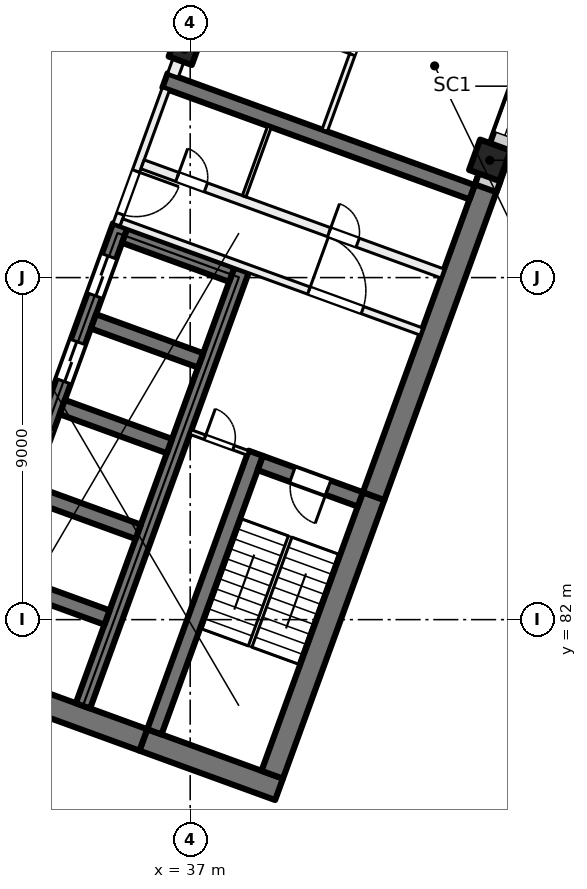
"""IFC4 building model, lengths in metres.
Left out: names, types, materials, properties, quantities, classifications, styles, units other than length and angle.
Written with IfcOpenShell. Run it as: python <this file> out.ifc"""

import sys

from ifc_helpers import new_model, si_unit, direction, frame, frame_2d, origin, origin_2d, place, context, subcontext, project, spatial, rectangle, extrude, element, fill, save


model = new_model("IFC4")
c1 = context("Model", 3, precision=1e-05, world=origin(), true_north=direction((0.0, 1.0)))
c2 = subcontext(c1, "Body", "Model", "MODEL_VIEW")
j1 = project(units=[si_unit("LENGTHUNIT", "METRE"), si_unit("PLANEANGLEUNIT", "RADIAN")], contexts=[c1])
p1 = place(None, origin())
s1 = spatial("IfcSite", under=j1, at=p1, CompositionType="ELEMENT")
p2 = place(p1, origin())
s2 = spatial("IfcBuilding", under=s1, at=p2, CompositionType="ELEMENT")
p3 = place(p2, frame((0.0, 0.0, 97.0)))
s3 = spatial("IfcBuildingStorey", under=s2, at=p3, CompositionType="ELEMENT", Elevation=97.0)
p4 = place(p3, frame((36.849, 97.011, 0.0), z_axis=(0.0, 0.0, 1.0), x_axis=(-0.342020143326, -0.939692620786, 0.0)))
e1 = element("IfcColumn", 1, at=p4, inside=s3, PredefinedType="COLUMN", context=c2, shape_type="SweptSolid", body=[
    extrude(rectangle(XDim=0.65, YDim=0.65, at=origin_2d()), origin(), (0.0, 0.0, 1.0), 4.0),
])
p5 = place(p3, frame((44.884, 94.087, 0.0), z_axis=(0.0, 0.0, 1.0), x_axis=(-0.342020143326, -0.939692620786, 0.0)))
e2 = element("IfcColumn", 2, at=p5, inside=s3, PredefinedType="COLUMN", context=c2, shape_type="SweptSolid", body=[
    extrude(rectangle(XDim=0.85, YDim=0.85, at=origin_2d()), origin(), (0.0, 0.0, 1.0), 4.0),
])
p6 = place(p3, frame((39.338, 77.535, 0.0), z_axis=(0.0, 0.0, 1.0), x_axis=(-0.939701471648, 0.341995824804, 0.0)))
e3 = element("IfcWall", 3, at=p6, inside=s3, PredefinedType="SHEAR", context=c2, shape_type="SweptSolid", body=[
    extrude(rectangle(XDim=3.8, YDim=0.6, at=frame_2d((1.9, 0.0))), origin(), (0.0, 0.0, 1.0), 4.0),
])
p7 = place(p3, frame((35.767, 78.835, 0.0), z_axis=(0.0, 0.0, 1.0), x_axis=(-0.939692894512, 0.342019391267, 0.0)))
e4 = element("IfcWall", 4, at=p7, inside=s3, PredefinedType="SHEAR", context=c2, shape_type="SweptSolid", body=[
    extrude(rectangle(XDim=14.4, YDim=0.6, at=frame_2d((7.2, 0.0))), origin(), (0.0, 0.0, 1.0), 4.0),
])
p8 = place(p3, frame((39.159, 77.92, 0.0), z_axis=(0.0, 0.0, 1.0), x_axis=(0.342016982193, 0.939693771338, 0.0)))
e5 = element("IfcWall", 5, at=p8, inside=s3, PredefinedType="SHEAR", context=c2, shape_type="SweptSolid", body=[
    extrude(rectangle(XDim=7.8, YDim=0.6, at=frame_2d((3.9, 0.0))), origin(), (0.0, 0.0, 1.0), 4.0),
])
p9 = place(p3, frame((41.827, 85.249, 0.0), z_axis=(0.0, 0.0, 1.0), x_axis=(0.342017595281, 0.939693548195, 0.0)))
e6 = element("IfcWall", 6, at=p9, inside=s3, PredefinedType="SHEAR", context=c2, shape_type="SweptSolid", body=[
    extrude(rectangle(XDim=8.925, YDim=0.6, at=frame_2d((4.462, 0.0))), origin(), (0.0, 0.0, 1.0), 4.0),
])
p10 = place(p3, frame((36.058, 79.048, 0.0), z_axis=(0.0, 0.0, 1.0), x_axis=(0.342016982193, 0.939693771338, 0.0)))
e7 = element("IfcWall", 7, at=p10, inside=s3, PredefinedType="SHEAR", context=c2, shape_type="SweptSolid", body=[
    extrude(rectangle(XDim=7.8, YDim=0.4, at=frame_2d((3.9, 0.0))), origin(), (0.0, 0.0, 1.0), 4.0),
])
p11 = place(p3, frame((41.476, 85.164, 0.0), z_axis=(0.0, 0.0, 1.0), x_axis=(-0.939678810556, 0.342058084236, 0.0)))
e8 = element("IfcWall", 8, at=p11, inside=s3, PredefinedType="SHEAR", context=c2, shape_type="SweptSolid", body=[
    extrude(rectangle(XDim=2.8, YDim=0.4, at=frame_2d((1.4, 0.0))), origin(), (0.0, 0.0, 1.0), 4.0),
])
p12 = place(p11, frame((0.9, 0.0, 0.0)))
e9 = element("IfcOpeningElement", 9, at=p12, cuts=e8, PredefinedType="OPENING", context=c2, shape_type="SweptSolid", body=[
    extrude(rectangle(XDim=1.0, YDim=2.1, at=frame_2d((0.5, 1.05))), frame((0.0, 0.21, 0.0), z_axis=(0.0, -1.0, 0.0), x_axis=(1.0, 0.0, 0.0)), (0.0, 0.0, 1.0), 0.42),
])
p13 = place(p3, frame((30.984, 80.895, 0.0), z_axis=(0.0, 0.0, 1.0), x_axis=(0.342021021735, 0.939692301071, 0.0)))
e10 = element("IfcWall", 10, at=p13, inside=s3, PredefinedType="SHEAR", context=c2, shape_type="SweptSolid", body=[
    extrude(rectangle(XDim=12.2, YDim=0.4, at=frame_2d((6.1, 0.0))), origin(), (0.0, 0.0, 1.0), 4.0),
])
p14 = place(p13, frame((5.45, 0.0, 0.0)))
e11 = element("IfcOpeningElement", 11, at=p14, cuts=e10, PredefinedType="OPENING", context=c2, shape_type="SweptSolid", body=[
    extrude(rectangle(XDim=1.1, YDim=2.1, at=frame_2d((0.55, 1.05))), frame((0.0, 0.21, 0.0), z_axis=(0.0, -1.0, 0.0), x_axis=(1.0, 0.0, 0.0)), (0.0, 0.0, 1.0), 0.42),
])
p15 = place(p13, frame((7.85, 0.0, 0.0)))
e12 = element("IfcOpeningElement", 12, at=p15, cuts=e10, PredefinedType="OPENING", context=c2, shape_type="SweptSolid", body=[
    extrude(rectangle(XDim=1.1, YDim=2.1, at=frame_2d((0.55, 1.05))), frame((0.0, 0.21, 0.0), z_axis=(0.0, -1.0, 0.0), x_axis=(1.0, 0.0, 0.0)), (0.0, 0.0, 1.0), 0.42),
])
p16 = place(p13, frame((10.25, 0.0, 0.0)))
e13 = element("IfcOpeningElement", 13, at=p16, cuts=e10, PredefinedType="OPENING", context=c2, shape_type="SweptSolid", body=[
    extrude(rectangle(XDim=1.1, YDim=2.1, at=frame_2d((0.55, 1.05))), frame((0.0, 0.21, 0.0), z_axis=(0.0, -1.0, 0.0), x_axis=(1.0, 0.0, 0.0)), (0.0, 0.0, 1.0), 0.42),
])
p17 = place(p3, frame((34.178, 79.732, 0.0), z_axis=(0.0, 0.0, 1.0), x_axis=(0.342014590177, 0.939694641948, 0.0)))
e14 = element("IfcWall", 14, at=p17, inside=s3, PredefinedType="SHEAR", context=c2, shape_type="SweptSolid", body=[
    extrude(rectangle(XDim=12.2, YDim=0.4, at=frame_2d((6.1, 0.0))), origin(), (0.0, 0.0, 1.0), 4.0),
])
for number, where, z_axis, x_axis in (
    (15, (34.812, 82.056, 0.0), (0.0, 0.0, 1.0), (-0.94, 0.342, 0.0)),
    (16, (35.632, 84.311, 0.0), (0.0, 0.0, 1.0), (-0.94, 0.342, 0.0)),
    (17, (36.453, 86.566, 0.0), (0.0, 0.0, 1.0), (-0.94, 0.342, 0.0)),
    (18, (37.274, 88.822, 0.0), (0.0, 0.0, 1.0), (-0.94, 0.342, 0.0)),
):
    element("IfcWall", number, at=place(p3, frame(where, z_axis=z_axis, x_axis=x_axis)), inside=s3, PredefinedType="SHEAR", context=c2, shape_type="SweptSolid", body=[
        extrude(rectangle(XDim=3.0, YDim=0.4, at=frame_2d((1.5, 0.0))), origin(), (0.0, 0.0, 1.0), 4.0),
    ])
p18 = place(p3, frame((38.095, 91.077, 0.0), z_axis=(0.0, 0.0, 1.0), x_axis=(-0.939676934218, 0.342063238742, 0.0)))
e19 = element("IfcWall", 19, at=p18, inside=s3, PredefinedType="SHEAR", context=c2, shape_type="SweptSolid", body=[
    extrude(rectangle(XDim=3.0, YDim=0.4, at=frame_2d((1.5, 0.0))), origin(), (0.0, 0.0, 1.0), 4.0),
])
p19 = place(p3, frame((44.418, 93.245, 0.0), z_axis=(0.0, 0.0, 1.0), x_axis=(-0.93969060187, 0.342025690201, 0.0)))
e20 = element("IfcWall", 20, at=p19, inside=s3, PredefinedType="SHEAR", context=c2, shape_type="SweptSolid", body=[
    extrude(rectangle(XDim=8.6, YDim=0.4, at=frame_2d((4.3, 0.0))), origin(), (0.0, 0.0, 1.0), 4.0),
])
p20 = place(p3, frame((52.212, 113.783, 0.0), z_axis=(0.0, 0.0, 1.0), x_axis=(-0.34202521188, -0.939690775968, 0.0)))
e21 = element("IfcWall", 21, at=p20, inside=s3, PredefinedType="SOLIDWALL", context=c2, shape_type="SweptSolid", body=[
    extrude(rectangle(XDim=21.745, YDim=0.6, at=frame_2d((10.873, 0.0))), origin(), (0.0, 0.0, 1.0), 3.625),
])
p21 = place(p20, frame((3.765, 0.0, 0.9)))
e22 = element("IfcOpeningElement", 22, at=p21, cuts=e21, PredefinedType="OPENING", context=c2, shape_type="SweptSolid", body=[
    extrude(rectangle(XDim=3.0, YDim=2.4, at=frame_2d((1.5, 1.2))), frame((0.0, 0.31, 0.0), z_axis=(0.0, -1.0, 0.0), x_axis=(1.0, 0.0, 0.0)), (0.0, 0.0, 1.0), 0.62),
])
p22 = place(p20, frame((8.265, 0.0, 0.9)))
e23 = element("IfcOpeningElement", 23, at=p22, cuts=e21, PredefinedType="OPENING", context=c2, shape_type="SweptSolid", body=[
    extrude(rectangle(XDim=3.0, YDim=2.4, at=frame_2d((1.5, 1.2))), frame((0.0, 0.31, 0.0), z_axis=(0.0, -1.0, 0.0), x_axis=(1.0, 0.0, 0.0)), (0.0, 0.0, 1.0), 0.62),
])
p23 = place(p20, frame((12.765, 0.0, 0.9)))
e24 = element("IfcOpeningElement", 24, at=p23, cuts=e21, PredefinedType="OPENING", context=c2, shape_type="SweptSolid", body=[
    extrude(rectangle(XDim=3.0, YDim=2.4, at=frame_2d((1.5, 1.2))), frame((0.0, 0.31, 0.0), z_axis=(0.0, -1.0, 0.0), x_axis=(1.0, 0.0, 0.0)), (0.0, 0.0, 1.0), 0.62),
])
p24 = place(p20, frame((17.265, 0.0, 0.9)))
e25 = element("IfcOpeningElement", 25, at=p24, cuts=e21, PredefinedType="OPENING", context=c2, shape_type="SweptSolid", body=[
    extrude(rectangle(XDim=3.0, YDim=2.4, at=frame_2d((1.5, 1.2))), frame((0.0, 0.31, 0.0), z_axis=(0.0, -1.0, 0.0), x_axis=(1.0, 0.0, 0.0)), (0.0, 0.0, 1.0), 0.62),
])
p25 = place(p3, frame((36.362, 95.964, 0.0), z_axis=(0.0, 0.0, 1.0), x_axis=(-0.341995824804, -0.939701471648, 0.0)))
e26 = element("IfcWall", 26, at=p25, inside=s3, PredefinedType="PARTITIONING", context=c2, shape_type="SweptSolid", body=[
    extrude(rectangle(XDim=3.8, YDim=0.2, at=frame_2d((1.9, 0.0))), origin(), (0.0, 0.0, 1.0), 3.625),
])
p26 = place(p25, frame((2.3, 0.0, 0.0)))
e27 = element("IfcOpeningElement", 27, at=p26, cuts=e26, PredefinedType="OPENING", context=c2, shape_type="SweptSolid", body=[
    extrude(rectangle(XDim=1.2, YDim=2.1, at=frame_2d((0.6, 1.05))), frame((0.0, 0.11, 0.0), z_axis=(0.0, -1.0, 0.0), x_axis=(1.0, 0.0, 0.0)), (0.0, 0.0, 1.0), 0.22),
])
p27 = place(p3, frame((35.19, 92.453, 0.0), z_axis=(0.0, 0.0, 1.0), x_axis=(0.939691552312, -0.342023078919, 0.0)))
e28 = element("IfcWall", 28, at=p27, inside=s3, PredefinedType="PARTITIONING", context=c2, shape_type="SweptSolid", body=[
    extrude(rectangle(XDim=8.4, YDim=0.2, at=frame_2d((4.2, 0.0))), origin(), (0.0, 0.0, 1.0), 3.625),
])
p28 = place(p27, frame((5.25, 0.0, 0.0)))
e29 = element("IfcOpeningElement", 29, at=p28, cuts=e28, PredefinedType="OPENING", context=c2, shape_type="SweptSolid", body=[
    extrude(rectangle(XDim=1.5, YDim=2.1, at=frame_2d((0.75, 1.05))), frame((0.0, 0.11, 0.0), z_axis=(0.0, -1.0, 0.0), x_axis=(1.0, 0.0, 0.0)), (0.0, 0.0, 1.0), 0.22),
])
p29 = place(p3, frame((35.746, 93.98, 0.0), z_axis=(0.0, 0.0, 1.0), x_axis=(0.939691552312, -0.342023078919, 0.0)))
e30 = element("IfcWall", 30, at=p29, inside=s3, PredefinedType="PARTITIONING", context=c2, shape_type="SweptSolid", body=[
    extrude(rectangle(XDim=8.4, YDim=0.25, at=frame_2d((4.2, 0.0))), origin(), (0.0, 0.0, 1.0), 3.625),
])
p30 = place(p29, frame((0.975, 0.0, 0.0)))
e31 = element("IfcOpeningElement", 31, at=p30, cuts=e30, PredefinedType="OPENING", context=c2, shape_type="SweptSolid", body=[
    extrude(rectangle(XDim=0.8, YDim=2.1, at=frame_2d((0.4, 1.05))), frame((0.0, 0.135, 0.0), z_axis=(0.0, -1.0, 0.0), x_axis=(1.0, 0.0, 0.0)), (0.0, 0.0, 1.0), 0.27),
])
p31 = place(p29, frame((5.225, 0.0, 0.0)))
e32 = element("IfcOpeningElement", 32, at=p31, cuts=e30, PredefinedType="OPENING", context=c2, shape_type="SweptSolid", body=[
    extrude(rectangle(XDim=0.8, YDim=2.1, at=frame_2d((0.4, 1.05))), frame((0.0, 0.135, 0.0), z_axis=(0.0, -1.0, 0.0), x_axis=(1.0, 0.0, 0.0)), (0.0, 0.0, 1.0), 0.27),
])
p32 = place(p3, frame((37.013, 86.935, 0.0), z_axis=(0.0, 0.0, 1.0), x_axis=(0.939659694648, -0.342110593602, 0.0)))
e33 = element("IfcWall", 33, at=p32, inside=s3, PredefinedType="PARTITIONING", context=c2, shape_type="SweptSolid", body=[
    extrude(rectangle(XDim=1.6, YDim=0.125, at=frame_2d((0.8, 0.0))), origin(), (0.0, 0.0, 1.0), 3.625),
])
p33 = place(p32, frame((0.4, 0.0, 0.0)))
e34 = element("IfcOpeningElement", 34, at=p33, cuts=e33, PredefinedType="OPENING", context=c2, shape_type="SweptSolid", body=[
    extrude(rectangle(XDim=0.8, YDim=2.1, at=frame_2d((0.4, 1.05))), frame((0.0, 0.073, 0.0), z_axis=(0.0, -1.0, 0.0), x_axis=(1.0, 0.0, 0.0)), (0.0, 0.0, 1.0), 0.145),
])
p34 = place(p3, frame((39.087, 94.973, 0.0), z_axis=(0.0, 0.0, 1.0), x_axis=(-0.342024501273, -0.939691034611, 0.0)))
e35 = element("IfcWall", 35, at=p34, inside=s3, PredefinedType="PARTITIONING", context=c2, shape_type="SweptSolid", body=[
    extrude(rectangle(XDim=1.95, YDim=0.1, at=frame_2d((0.975, 0.0))), origin(), (0.0, 0.0, 1.0), 3.625),
])
p35 = place(p3, frame((40.539, 94.87, 0.0), z_axis=(0.0, 0.0, 1.0), x_axis=(0.342082231415, 0.939670020247, 0.0)))
e36 = element("IfcWall", 36, at=p35, inside=s3, PredefinedType="PARTITIONING", context=c2, shape_type="SweptSolid", body=[
    extrude(rectangle(XDim=9.825, YDim=0.15, at=frame_2d((4.912, 0.0))), origin(), (0.0, 0.0, 1.0), 3.625),
])
p36 = place(p35, frame((2.125, 0.0, 0.0)))
e37 = element("IfcOpeningElement", 37, at=p36, cuts=e36, PredefinedType="OPENING", context=c2, shape_type="SweptSolid", body=[
    extrude(rectangle(XDim=1.0, YDim=2.1, at=frame_2d((0.5, 1.05))), frame((0.0, 0.085, 0.0), z_axis=(0.0, -1.0, 0.0), x_axis=(1.0, 0.0, 0.0)), (0.0, 0.0, 1.0), 0.17),
])
p37 = place(p35, frame((7.0, 0.0, 0.0)))
e38 = element("IfcOpeningElement", 38, at=p37, cuts=e36, PredefinedType="OPENING", context=c2, shape_type="SweptSolid", body=[
    extrude(rectangle(XDim=1.0, YDim=2.1, at=frame_2d((0.5, 1.05))), frame((0.0, 0.085, 0.0), z_axis=(0.0, -1.0, 0.0), x_axis=(1.0, 0.0, 0.0)), (0.0, 0.0, 1.0), 0.17),
])
p38 = place(p3, frame((47.314, 125.909, 0.0), z_axis=(0.0, 0.0, 1.0), x_axis=(-0.342010770371, -0.939696032209, 0.0)))
e39 = element("IfcWall", 39, at=p38, inside=s3, PredefinedType="PARTITIONING", context=c2, shape_type="SweptSolid", body=[
    extrude(rectangle(XDim=31.485, YDim=0.3, at=frame_2d((15.742, 0.0))), origin(), (0.0, 0.0, 1.0), 3.625),
])
p39 = place(p38, frame((23.459, 0.0, 0.0)))
e40 = element("IfcOpeningElement", 40, at=p39, cuts=e39, PredefinedType="OPENING", context=c2, shape_type="SweptSolid", body=[
    extrude(rectangle(XDim=1.8, YDim=2.1, at=frame_2d((0.9, 1.05))), frame((0.0, 0.16, 0.0), z_axis=(0.0, -1.0, 0.0), x_axis=(1.0, 0.0, 0.0)), (0.0, 0.0, 1.0), 0.32),
])
p40 = place(p38, frame((14.385, 0.0, 0.0)))
e41 = element("IfcOpeningElement", 41, at=p40, cuts=e39, PredefinedType="OPENING", context=c2, shape_type="SweptSolid", body=[
    extrude(rectangle(XDim=1.2, YDim=2.1, at=frame_2d((0.6, 1.05))), frame((0.0, 0.16, 0.0), z_axis=(0.0, -1.0, 0.0), x_axis=(1.0, 0.0, 0.0)), (0.0, 0.0, 1.0), 0.32),
])
p41 = place(p38, frame((9.885, 0.0, 0.0)))
e42 = element("IfcOpeningElement", 42, at=p41, cuts=e39, PredefinedType="OPENING", context=c2, shape_type="SweptSolid", body=[
    extrude(rectangle(XDim=1.2, YDim=2.1, at=frame_2d((0.6, 1.05))), frame((0.0, 0.16, 0.0), z_axis=(0.0, -1.0, 0.0), x_axis=(1.0, 0.0, 0.0)), (0.0, 0.0, 1.0), 0.32),
])
p42 = place(p38, frame((5.384, 0.0, 0.0)))
e43 = element("IfcOpeningElement", 43, at=p42, cuts=e39, PredefinedType="OPENING", context=c2, shape_type="SweptSolid", body=[
    extrude(rectangle(XDim=1.2, YDim=2.1, at=frame_2d((0.6, 1.05))), frame((0.0, 0.16, 0.0), z_axis=(0.0, -1.0, 0.0), x_axis=(1.0, 0.0, 0.0)), (0.0, 0.0, 1.0), 0.32),
])
p43 = place(p24, origin())
e44 = element("IfcWindow", 44, at=p43, inside=s3, PartitioningType="SINGLE_PANEL", PredefinedType="WINDOW", context=c2, shape_type="SweptSolid", body=[
    extrude(rectangle(XDim=3.0, YDim=2.4, at=frame_2d((1.5, 1.2))), frame((0.0, 0.03, 0.0), z_axis=(0.0, -1.0, 0.0), x_axis=(1.0, 0.0, 0.0)), (0.0, 0.0, 1.0), 0.06),
])
fill(e25, e44)
p44 = place(p15, origin())
e45 = element("IfcDoor", 45, at=p44, inside=s3, OperationType="DOUBLE_DOOR_SLIDING", PredefinedType="DOOR", context=c2, shape_type="SweptSolid", body=[
    extrude(rectangle(XDim=1.1, YDim=2.1, at=frame_2d((0.55, 1.05))), frame((0.0, 0.025, 0.0), z_axis=(0.0, -1.0, 0.0), x_axis=(1.0, 0.0, 0.0)), (0.0, 0.0, 1.0), 0.05),
])
fill(e12, e45)
p45 = place(p16, origin())
e46 = element("IfcDoor", 46, at=p45, inside=s3, OperationType="DOUBLE_DOOR_SLIDING", PredefinedType="DOOR", context=c2, shape_type="SweptSolid", body=[
    extrude(rectangle(XDim=1.1, YDim=2.1, at=frame_2d((0.55, 1.05))), frame((0.0, 0.025, 0.0), z_axis=(0.0, -1.0, 0.0), x_axis=(1.0, 0.0, 0.0)), (0.0, 0.0, 1.0), 0.05),
])
fill(e13, e46)
p46 = place(p26, origin())
e47 = element("IfcDoor", 47, at=p46, inside=s3, OperationType="DOUBLE_DOOR_SINGLE_SWING", PredefinedType="DOOR", context=c2, shape_type="SweptSolid", body=[
    extrude(rectangle(XDim=1.2, YDim=2.1, at=frame_2d((0.6, 1.05))), frame((0.0, 0.025, 0.0), z_axis=(0.0, -1.0, 0.0), x_axis=(1.0, 0.0, 0.0)), (0.0, 0.0, 1.0), 0.05),
])
fill(e27, e47)
p47 = place(p28, origin())
e48 = element("IfcDoor", 48, at=p47, inside=s3, OperationType="DOUBLE_DOOR_SINGLE_SWING", PredefinedType="DOOR", context=c2, shape_type="SweptSolid", body=[
    extrude(rectangle(XDim=1.5, YDim=2.1, at=frame_2d((0.75, 1.05))), frame((0.0, 0.025, 0.0), z_axis=(0.0, -1.0, 0.0), x_axis=(1.0, 0.0, 0.0)), (0.0, 0.0, 1.0), 0.05),
])
fill(e29, e48)
p48 = place(p12, origin())
e49 = element("IfcDoor", 49, at=p48, inside=s3, OperationType="SINGLE_SWING_RIGHT", PredefinedType="DOOR", context=c2, shape_type="SweptSolid", body=[
    extrude(rectangle(XDim=1.0, YDim=2.1, at=frame_2d((0.5, 1.05))), frame((0.0, 0.025, 0.0), z_axis=(0.0, -1.0, 0.0), x_axis=(1.0, 0.0, 0.0)), (0.0, 0.0, 1.0), 0.05),
])
fill(e9, e49)
p49 = place(p33, origin())
e50 = element("IfcDoor", 50, at=p49, inside=s3, OperationType="SINGLE_SWING_LEFT", PredefinedType="DOOR", context=c2, shape_type="SweptSolid", body=[
    extrude(rectangle(XDim=0.8, YDim=2.1, at=frame_2d((0.4, 1.05))), frame((0.0, 0.025, 0.0), z_axis=(0.0, -1.0, 0.0), x_axis=(1.0, 0.0, 0.0)), (0.0, 0.0, 1.0), 0.05),
])
fill(e34, e50)
p50 = place(p30, origin())
e51 = element("IfcDoor", 51, at=p50, inside=s3, OperationType="SINGLE_SWING_RIGHT", PredefinedType="DOOR", context=c2, shape_type="SweptSolid", body=[
    extrude(rectangle(XDim=0.8, YDim=2.1, at=frame_2d((0.4, 1.05))), frame((0.0, 0.025, 0.0), z_axis=(0.0, -1.0, 0.0), x_axis=(1.0, 0.0, 0.0)), (0.0, 0.0, 1.0), 0.05),
])
fill(e31, e51)
p51 = place(p31, origin())
e52 = element("IfcDoor", 52, at=p51, inside=s3, OperationType="SINGLE_SWING_LEFT", PredefinedType="DOOR", context=c2, shape_type="SweptSolid", body=[
    extrude(rectangle(XDim=0.8, YDim=2.1, at=frame_2d((0.4, 1.05))), frame((0.0, 0.025, 0.0), z_axis=(0.0, -1.0, 0.0), x_axis=(1.0, 0.0, 0.0)), (0.0, 0.0, 1.0), 0.05),
])
fill(e32, e52)
p52 = place(p36, origin())
e53 = element("IfcDoor", 53, at=p52, inside=s3, OperationType="SINGLE_SWING_LEFT", PredefinedType="DOOR", context=c2, shape_type="SweptSolid", body=[
    extrude(rectangle(XDim=1.0, YDim=2.1, at=frame_2d((0.5, 1.05))), frame((0.0, 0.025, 0.0), z_axis=(0.0, -1.0, 0.0), x_axis=(1.0, 0.0, 0.0)), (0.0, 0.0, 1.0), 0.05),
])
fill(e37, e53)
save(model, sys.argv[1])
